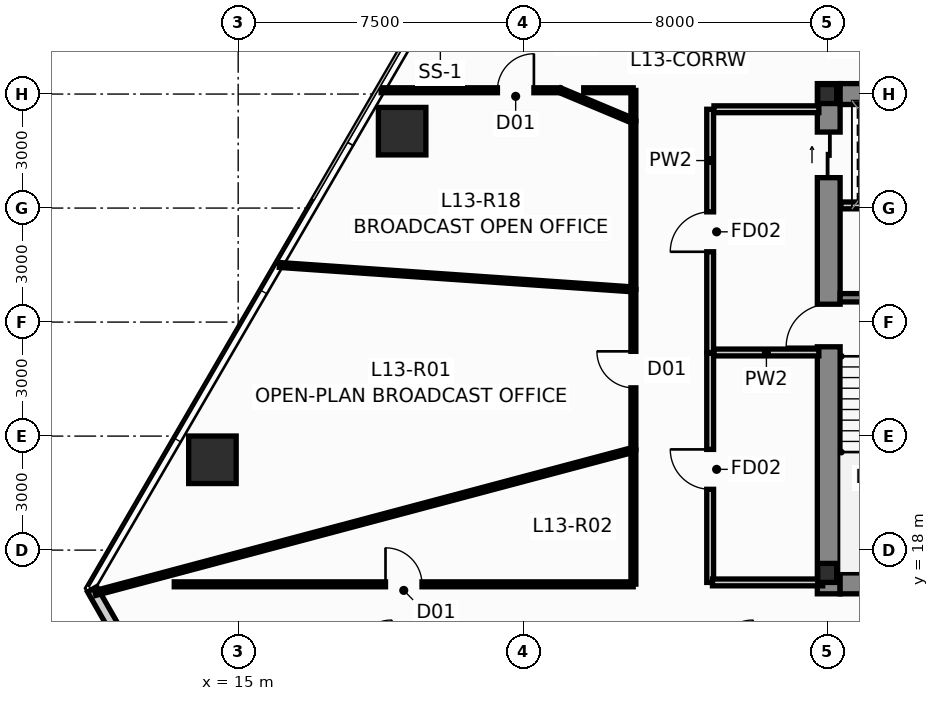
"""IFC4 building model, lengths in metres.
Left out: names, types, materials, properties, quantities, classifications, styles, units other than length and angle.
Written with IfcOpenShell. Run it as: python <this file> out.ifc"""

import sys

from ifc_helpers import new_model, si_unit, direction, frame, frame_2d, origin, origin_2d, place, context, subcontext, project, spatial, rectangle, hollow_rectangle, i_section, extrude, source, transform, mapped, element, fill, save


model = new_model("IFC4")
c1 = context("Model", 3, precision=1e-05, world=origin(), true_north=direction((0.0, 1.0)))
c2 = subcontext(c1, "Body", "Model", "MODEL_VIEW")
j1 = project(units=[si_unit("LENGTHUNIT", "METRE"), si_unit("PLANEANGLEUNIT", "RADIAN")], contexts=[c1])
p1 = place(None, origin())
s1 = spatial("IfcSite", under=j1, at=p1, CompositionType="ELEMENT")
p2 = place(p1, origin())
s2 = spatial("IfcBuilding", under=s1, at=p2, CompositionType="ELEMENT")
p3 = place(p2, frame((0.0, 0.0, 53.15)))
s3 = spatial("IfcBuildingStorey", under=s2, at=p3, CompositionType="ELEMENT", Elevation=53.15)
m1 = source(origin(), c2, "Body", "SweptSolid", [
    extrude(i_section(OverallWidth=0.5, OverallDepth=0.5, WebThickness=0.028, FlangeThickness=0.04, at=origin_2d()), origin(), (0.0, 0.0, 1.0), 3.65),
])
for number, where, z_axis, x_axis in (
    (1, (30.5, 17.4, 0.0), (0.0, 0.0, 1.0), (1.0, 0.0, 0.0)),
    (2, (30.5, 30.0, 0.0), (0.0, 0.0, 1.0), (1.0, 0.0, 0.0)),
):
    element("IfcColumn", number, at=place(p3, frame(where, z_axis=z_axis, x_axis=x_axis)), inside=s3, PredefinedType="COLUMN", context=c2, shape_type="MappedRepresentation", body=[
        mapped(m1, transform((0.0, 0.0, 0.0), scale=1.0)),
    ])
p4 = place(p3, frame((30.54, 16.85, 0.0), z_axis=(0.0, 0.0, 1.0), x_axis=(0.0, 1.0, 0.0)))
e3 = element("IfcWall", 3, at=p4, inside=s3, PredefinedType="SHEAR", context=c2, shape_type="SweptSolid", body=[
    extrude(rectangle(XDim=13.425, YDim=0.6, at=frame_2d((6.712, 0.0))), origin(), (0.0, 0.0, 1.0), 3.65),
])
p5 = place(p4, frame((6.5, 0.0, 0.0)))
e4 = element("IfcOpeningElement", 4, at=p5, cuts=e3, PredefinedType="OPENING", context=c2, shape_type="SweptSolid", body=[
    extrude(rectangle(XDim=1.12, YDim=2.15, at=frame_2d((0.56, 1.075))), frame((0.0, 0.312, 0.0), z_axis=(0.0, -1.0, 0.0), x_axis=(1.0, 0.0, 0.0)), (0.0, 0.0, 1.0), 0.624),
])
p6 = place(p4, frame((10.95, 0.0, 0.0)))
e5 = element("IfcOpeningElement", 5, at=p6, cuts=e3, PredefinedType="OPENING", context=c2, shape_type="SweptSolid", body=[
    extrude(rectangle(XDim=1.2, YDim=2.2, at=frame_2d((0.6, 1.1))), frame((0.0, 0.312, 0.0), z_axis=(0.0, -1.0, 0.0), x_axis=(1.0, 0.0, 0.0)), (0.0, 0.0, 1.0), 0.624),
])
for number, where, z_axis, x_axis in (
    (6, (30.84, 17.125, 0.0), (0.0, 0.0, 1.0), (1.0, 0.0, 0.0)),
    (7, (30.84, 30.0, 0.0), (0.0, 0.0, 1.0), (1.0, 0.0, 0.0)),
):
    element("IfcWall", number, at=place(p3, frame(where, z_axis=z_axis, x_axis=x_axis)), inside=s3, PredefinedType="SHEAR", context=c2, shape_type="SweptSolid", body=[
        extrude(rectangle(XDim=2.9, YDim=0.55, at=frame_2d((1.45, 0.0))), origin(), (0.0, 0.0, 1.0), 3.65),
    ])
p7 = place(p3, frame((30.84, 24.64, 0.0), z_axis=(0.0, 0.0, 1.0), x_axis=(1.0, 0.0, 0.0)))
e8 = element("IfcWall", 8, at=p7, inside=s3, PredefinedType="SHEAR", context=c2, shape_type="SweptSolid", body=[
    extrude(rectangle(XDim=2.9, YDim=0.22, at=frame_2d((1.45, 0.0))), origin(), (0.0, 0.0, 1.0), 3.65),
])
m2 = source(origin(), c2, "Body", "SweptSolid", [
    extrude(hollow_rectangle(XDim=1.25, YDim=1.25, WallThickness=0.07, at=origin_2d()), origin(), (0.0, 0.0, 1.0), 3.651),
])
p8 = place(p3, frame((19.314, 29.024, 0.0), z_axis=(0.014912316331, -0.013775502979, 0.999793907933), x_axis=(0.678553674548, 0.734550822447, 0.0)))
e9 = element("IfcColumn", 9, at=p8, inside=s3, PredefinedType="COLUMN", context=c2, shape_type="MappedRepresentation", body=[
    mapped(m2, transform((0.0, 0.0, 0.0), scale=1.0)),
])
m3 = source(origin(), c2, "Body", "SweptSolid", [
    extrude(hollow_rectangle(XDim=1.25, YDim=1.25, WallThickness=0.07, at=origin_2d()), origin(), (0.0, 0.0, 1.0), 3.651),
])
p9 = place(p3, frame((14.323, 20.377, 0.0), z_axis=(0.010364224337, -0.0215977062, 0.999713019792), x_axis=(0.901566609123, 0.432640323264, 0.0)))
e10 = element("IfcColumn", 10, at=p9, inside=s3, PredefinedType="COLUMN", context=c2, shape_type="MappedRepresentation", body=[
    mapped(m3, transform((0.0, 0.0, 0.0), scale=1.0)),
])
p10 = place(p3, frame((18.374, 4.338, 0.0), z_axis=(0.0, 0.0, 1.0), x_axis=(-0.496050374025, 0.868293744322, 0.0)))
e11 = element("IfcWall", 11, at=p10, inside=s3, PredefinedType="STANDARD", context=c2, shape_type="SweptSolid", body=[
    extrude(rectangle(XDim=14.547, YDim=0.28, at=frame_2d((7.273, 0.0))), origin(), (0.0, 0.0, 1.0), 3.4),
])
p11 = place(p10, frame((6.37, 0.0, 0.9)))
e12 = element("IfcOpeningElement", 12, at=p11, cuts=e11, PredefinedType="OPENING", context=c2, shape_type="SweptSolid", body=[
    extrude(rectangle(XDim=1.8, YDim=1.8, at=frame_2d((0.9, 0.9))), frame((0.0, 0.152, 0.0), z_axis=(0.0, -1.0, 0.0), x_axis=(1.0, 0.0, 0.0)), (0.0, 0.0, 1.0), 0.304),
])
p12 = place(p3, frame((27.42, 23.2, 0.0), z_axis=(0.0, 0.0, 1.0), x_axis=(0.0, 1.0, 0.0)))
e13 = element("IfcWall", 13, at=p12, inside=s3, PredefinedType="PARTITIONING", context=c2, shape_type="SweptSolid", body=[
    extrude(rectangle(XDim=6.4, YDim=0.18, at=frame_2d((3.2, 0.0))), origin(), (0.0, 0.0, 1.0), 3.027),
])
p13 = place(p12, frame((2.65, 0.0, 0.0)))
e14 = element("IfcOpeningElement", 14, at=p13, cuts=e13, PredefinedType="OPENING", context=c2, shape_type="SweptSolid", body=[
    extrude(rectangle(XDim=1.05, YDim=2.15, at=frame_2d((0.525, 1.075))), frame((0.0, 0.102, 0.0), z_axis=(0.0, -1.0, 0.0), x_axis=(1.0, 0.0, 0.0)), (0.0, 0.0, 1.0), 0.204),
])
p14 = place(p3, frame((27.52, 23.2, 0.0), z_axis=(0.0, 0.0, 1.0), x_axis=(1.0, 0.0, 0.0)))
e15 = element("IfcWall", 15, at=p14, inside=s3, PredefinedType="PARTITIONING", context=c2, shape_type="SweptSolid", body=[
    extrude(rectangle(XDim=2.76, YDim=0.18, at=frame_2d((1.38, 0.0))), origin(), (0.0, 0.0, 1.0), 3.4),
])
p15 = place(p3, frame((27.52, 29.6, 0.0), z_axis=(0.0, 0.0, 1.0), x_axis=(1.0, 0.0, 0.0)))
e16 = element("IfcWall", 16, at=p15, inside=s3, PredefinedType="PARTITIONING", context=c2, shape_type="SweptSolid", body=[
    extrude(rectangle(XDim=2.76, YDim=0.18, at=frame_2d((1.38, 0.0))), origin(), (0.0, 0.0, 1.0), 2.783),
])
p16 = place(p3, frame((30.86, 27.07, 0.0), z_axis=(0.0, 0.0, 1.0), x_axis=(1.0, 0.0, 0.0)))
e17 = element("IfcWall", 17, at=p16, inside=s3, PredefinedType="PARTITIONING", context=c2, shape_type="SweptSolid", body=[
    extrude(rectangle(XDim=2.9, YDim=0.18, at=frame_2d((1.45, 0.0))), origin(), (0.0, 0.0, 1.0), 3.4),
])
p17 = place(p3, frame((27.42, 17.15, 0.0), z_axis=(0.0, 0.0, 1.0), x_axis=(0.0, 1.0, 0.0)))
e18 = element("IfcWall", 18, at=p17, inside=s3, PredefinedType="PARTITIONING", context=c2, shape_type="SweptSolid", body=[
    extrude(rectangle(XDim=6.03, YDim=0.18, at=frame_2d((3.015, 0.0))), origin(), (0.0, 0.0, 1.0), 3.4),
])
p18 = place(p17, frame((2.45, 0.0, 0.0)))
e19 = element("IfcOpeningElement", 19, at=p18, cuts=e18, PredefinedType="OPENING", context=c2, shape_type="SweptSolid", body=[
    extrude(rectangle(XDim=1.05, YDim=2.15, at=frame_2d((0.525, 1.075))), frame((0.0, 0.102, 0.0), z_axis=(0.0, -1.0, 0.0), x_axis=(1.0, 0.0, 0.0)), (0.0, 0.0, 1.0), 0.204),
])
p19 = place(p3, frame((27.48, 17.15, 0.0), z_axis=(0.0, 0.0, 1.0), x_axis=(1.0, 0.0, 0.0)))
e20 = element("IfcWall", 20, at=p19, inside=s3, PredefinedType="PARTITIONING", context=c2, shape_type="SweptSolid", body=[
    extrude(rectangle(XDim=2.9, YDim=0.18, at=frame_2d((1.45, 0.0))), origin(), (0.0, 0.0, 1.0), 2.783),
])
p20 = place(p3, frame((11.237, 16.87, 0.0), z_axis=(0.0, 0.0, 1.0), x_axis=(0.966343824017, 0.257253986915, 0.0)))
e21 = element("IfcWall", 21, at=p20, inside=s3, PredefinedType="PARTITIONING", context=c2, shape_type="SweptSolid", body=[
    extrude(rectangle(XDim=14.651, YDim=0.13, at=frame_2d((7.326, 0.0))), origin(), (0.0, 0.0, 1.0), 3.4),
])
p21 = place(p3, frame((13.318, 17.1, 0.0), z_axis=(0.0, 0.0, 1.0), x_axis=(1.0, 0.0, 0.0)))
e22 = element("IfcWall", 22, at=p21, inside=s3, PredefinedType="PARTITIONING", context=c2, shape_type="SweptSolid", body=[
    extrude(rectangle(XDim=12.077, YDim=0.13, at=frame_2d((6.039, 0.0))), origin(), (0.0, 0.0, 1.0), 3.4),
])
p22 = place(p21, frame((5.559, 0.0, 0.0)))
e23 = element("IfcOpeningElement", 23, at=p22, cuts=e22, PredefinedType="OPENING", context=c2, shape_type="SweptSolid", body=[
    extrude(rectangle(XDim=0.96, YDim=2.15, at=frame_2d((0.48, 1.075))), frame((0.0, 0.077, 0.0), z_axis=(0.0, -1.0, 0.0), x_axis=(1.0, 0.0, 0.0)), (0.0, 0.0, 1.0), 0.154),
])
p23 = place(p3, frame((16.087, 25.503, 0.0), z_axis=(0.0, 0.0, 1.0), x_axis=(0.997625619207, -0.06887034123, 0.0)))
e24 = element("IfcWall", 24, at=p23, inside=s3, PredefinedType="PARTITIONING", context=c2, shape_type="SweptSolid", body=[
    extrude(rectangle(XDim=9.33, YDim=0.13, at=frame_2d((4.665, 0.0))), origin(), (0.0, 0.0, 1.0), 3.4),
])
p24 = place(p3, frame((18.762, 30.1, 0.0), z_axis=(0.0, 0.0, 1.0), x_axis=(1.0, 0.0, 0.0)))
e25 = element("IfcWall", 25, at=p24, inside=s3, PredefinedType="PARTITIONING", context=c2, shape_type="SweptSolid", body=[
    extrude(rectangle(XDim=4.703, YDim=0.13, at=frame_2d((2.352, 0.0))), origin(), (0.0, 0.0, 1.0), 3.4),
])
p25 = place(p24, frame((3.06, 0.0, 0.0)))
e26 = element("IfcOpeningElement", 26, at=p25, cuts=e25, PredefinedType="OPENING", context=c2, shape_type="SweptSolid", body=[
    extrude(rectangle(XDim=0.96, YDim=2.15, at=frame_2d((0.48, 1.075))), frame((0.0, 0.077, 0.0), z_axis=(0.0, -1.0, 0.0), x_axis=(1.0, 0.0, 0.0)), (0.0, 0.0, 1.0), 0.154),
])
p26 = place(p3, frame((25.4, 24.865, 0.0), z_axis=(0.0, 0.0, 1.0), x_axis=(0.0, 1.0, 0.0)))
e27 = element("IfcWall", 27, at=p26, inside=s3, PredefinedType="PARTITIONING", context=c2, shape_type="SweptSolid", body=[
    extrude(rectangle(XDim=4.42, YDim=0.13, at=frame_2d((2.21, 0.0))), origin(), (0.0, 0.0, 1.0), 3.027),
])
p27 = place(p3, frame((25.4, 20.645, 0.0), z_axis=(0.0, 0.0, 1.0), x_axis=(0.0, 1.0, 0.0)))
e28 = element("IfcWall", 28, at=p27, inside=s3, PredefinedType="PARTITIONING", context=c2, shape_type="SweptSolid", body=[
    extrude(rectangle(XDim=4.21, YDim=0.13, at=frame_2d((2.105, 0.0))), origin(), (0.0, 0.0, 1.0), 3.4),
])
p28 = place(p27, frame((1.625, 0.0, 0.0)))
e29 = element("IfcOpeningElement", 29, at=p28, cuts=e28, PredefinedType="OPENING", context=c2, shape_type="SweptSolid", body=[
    extrude(rectangle(XDim=0.96, YDim=2.15, at=frame_2d((0.48, 1.075))), frame((0.0, 0.077, 0.0), z_axis=(0.0, -1.0, 0.0), x_axis=(1.0, 0.0, 0.0)), (0.0, 0.0, 1.0), 0.154),
])
p29 = place(p3, frame((25.4, 17.105, 0.0), z_axis=(0.0, 0.0, 1.0), x_axis=(0.0, 1.0, 0.0)))
e30 = element("IfcWall", 30, at=p29, inside=s3, PredefinedType="PARTITIONING", context=c2, shape_type="SweptSolid", body=[
    extrude(rectangle(XDim=3.53, YDim=0.13, at=frame_2d((1.765, 0.0))), origin(), (0.0, 0.0, 1.0), 3.027),
])
p30 = place(p3, frame((23.475, 30.098, 0.0), z_axis=(0.0, 0.0, 1.0), x_axis=(0.922060785378, -0.387045098236, 0.0)))
e31 = element("IfcWall", 31, at=p30, inside=s3, PredefinedType="PARTITIONING", context=c2, shape_type="SweptSolid", body=[
    extrude(rectangle(XDim=2.082, YDim=0.13, at=frame_2d((1.041, 0.0))), origin(), (0.0, 0.0, 1.0), 3.4),
])
p31 = place(p3, frame((25.395, 30.1, 0.0), z_axis=(0.0, 0.0, 1.0), x_axis=(-1.0, 0.0, 0.0)))
e32 = element("IfcWall", 32, at=p31, inside=s3, PredefinedType="PARTITIONING", context=c2, shape_type="SweptSolid", body=[
    extrude(rectangle(XDim=1.302, YDim=0.13, at=frame_2d((0.651, 0.0))), origin(), (0.0, 0.0, 1.0), 3.4),
])
p32 = place(p3, frame((25.4, 29.295, 0.0), z_axis=(0.0, 0.0, 1.0), x_axis=(0.0, 1.0, 0.0)))
e33 = element("IfcWall", 33, at=p32, inside=s3, PredefinedType="PARTITIONING", context=c2, shape_type="SweptSolid", body=[
    extrude(rectangle(XDim=0.8, YDim=0.13, at=frame_2d((0.4, 0.0))), origin(), (0.0, 0.0, 1.0), 3.027),
])
p33 = place(p5, origin())
e34 = element("IfcDoor", 34, at=p33, inside=s3, OperationType="SINGLE_SWING_LEFT", PredefinedType="DOOR", context=c2, shape_type="SweptSolid", body=[
    extrude(rectangle(XDim=1.12, YDim=2.15, at=frame_2d((0.56, 1.075))), frame((0.0, 0.025, 0.0), z_axis=(0.0, -1.0, 0.0), x_axis=(1.0, 0.0, 0.0)), (0.0, 0.0, 1.0), 0.05),
])
fill(e4, e34)
p34 = place(p6, origin())
e35 = element("IfcDoor", 35, at=p34, inside=s3, OperationType="SLIDING_TO_LEFT", PredefinedType="DOOR", context=c2, shape_type="SweptSolid", body=[
    extrude(rectangle(XDim=1.2, YDim=2.2, at=frame_2d((0.6, 1.1))), frame((0.0, 0.025, 0.0), z_axis=(0.0, -1.0, 0.0), x_axis=(1.0, 0.0, 0.0)), (0.0, 0.0, 1.0), 0.05),
])
fill(e5, e35)
p35 = place(p13, origin())
e36 = element("IfcDoor", 36, at=p35, inside=s3, OperationType="SINGLE_SWING_LEFT", PredefinedType="DOOR", context=c2, shape_type="SweptSolid", body=[
    extrude(rectangle(XDim=1.05, YDim=2.15, at=frame_2d((0.525, 1.075))), frame((0.0, 0.025, 0.0), z_axis=(0.0, -1.0, 0.0), x_axis=(1.0, 0.0, 0.0)), (0.0, 0.0, 1.0), 0.05),
])
fill(e14, e36)
p36 = place(p18, origin())
e37 = element("IfcDoor", 37, at=p36, inside=s3, OperationType="SINGLE_SWING_RIGHT", PredefinedType="DOOR", context=c2, shape_type="SweptSolid", body=[
    extrude(rectangle(XDim=1.05, YDim=2.15, at=frame_2d((0.525, 1.075))), frame((0.0, 0.025, 0.0), z_axis=(0.0, -1.0, 0.0), x_axis=(1.0, 0.0, 0.0)), (0.0, 0.0, 1.0), 0.05),
])
fill(e19, e37)
p37 = place(p22, origin())
e38 = element("IfcDoor", 38, at=p37, inside=s3, OperationType="SINGLE_SWING_LEFT", PredefinedType="DOOR", context=c2, shape_type="SweptSolid", body=[
    extrude(rectangle(XDim=0.96, YDim=2.15, at=frame_2d((0.48, 1.075))), frame((0.0, 0.025, 0.0), z_axis=(0.0, -1.0, 0.0), x_axis=(1.0, 0.0, 0.0)), (0.0, 0.0, 1.0), 0.05),
])
fill(e23, e38)
p38 = place(p25, origin())
e39 = element("IfcDoor", 39, at=p38, inside=s3, OperationType="SINGLE_SWING_RIGHT", PredefinedType="DOOR", context=c2, shape_type="SweptSolid", body=[
    extrude(rectangle(XDim=0.96, YDim=2.15, at=frame_2d((0.48, 1.075))), frame((0.0, 0.025, 0.0), z_axis=(0.0, -1.0, 0.0), x_axis=(1.0, 0.0, 0.0)), (0.0, 0.0, 1.0), 0.05),
])
fill(e26, e39)
p39 = place(p28, origin())
e40 = element("IfcDoor", 40, at=p39, inside=s3, OperationType="SINGLE_SWING_RIGHT", PredefinedType="DOOR", context=c2, shape_type="SweptSolid", body=[
    extrude(rectangle(XDim=0.96, YDim=2.15, at=frame_2d((0.48, 1.075))), frame((0.0, 0.025, 0.0), z_axis=(0.0, -1.0, 0.0), x_axis=(1.0, 0.0, 0.0)), (0.0, 0.0, 1.0), 0.05),
])
fill(e29, e40)
save(model, sys.argv[1])
